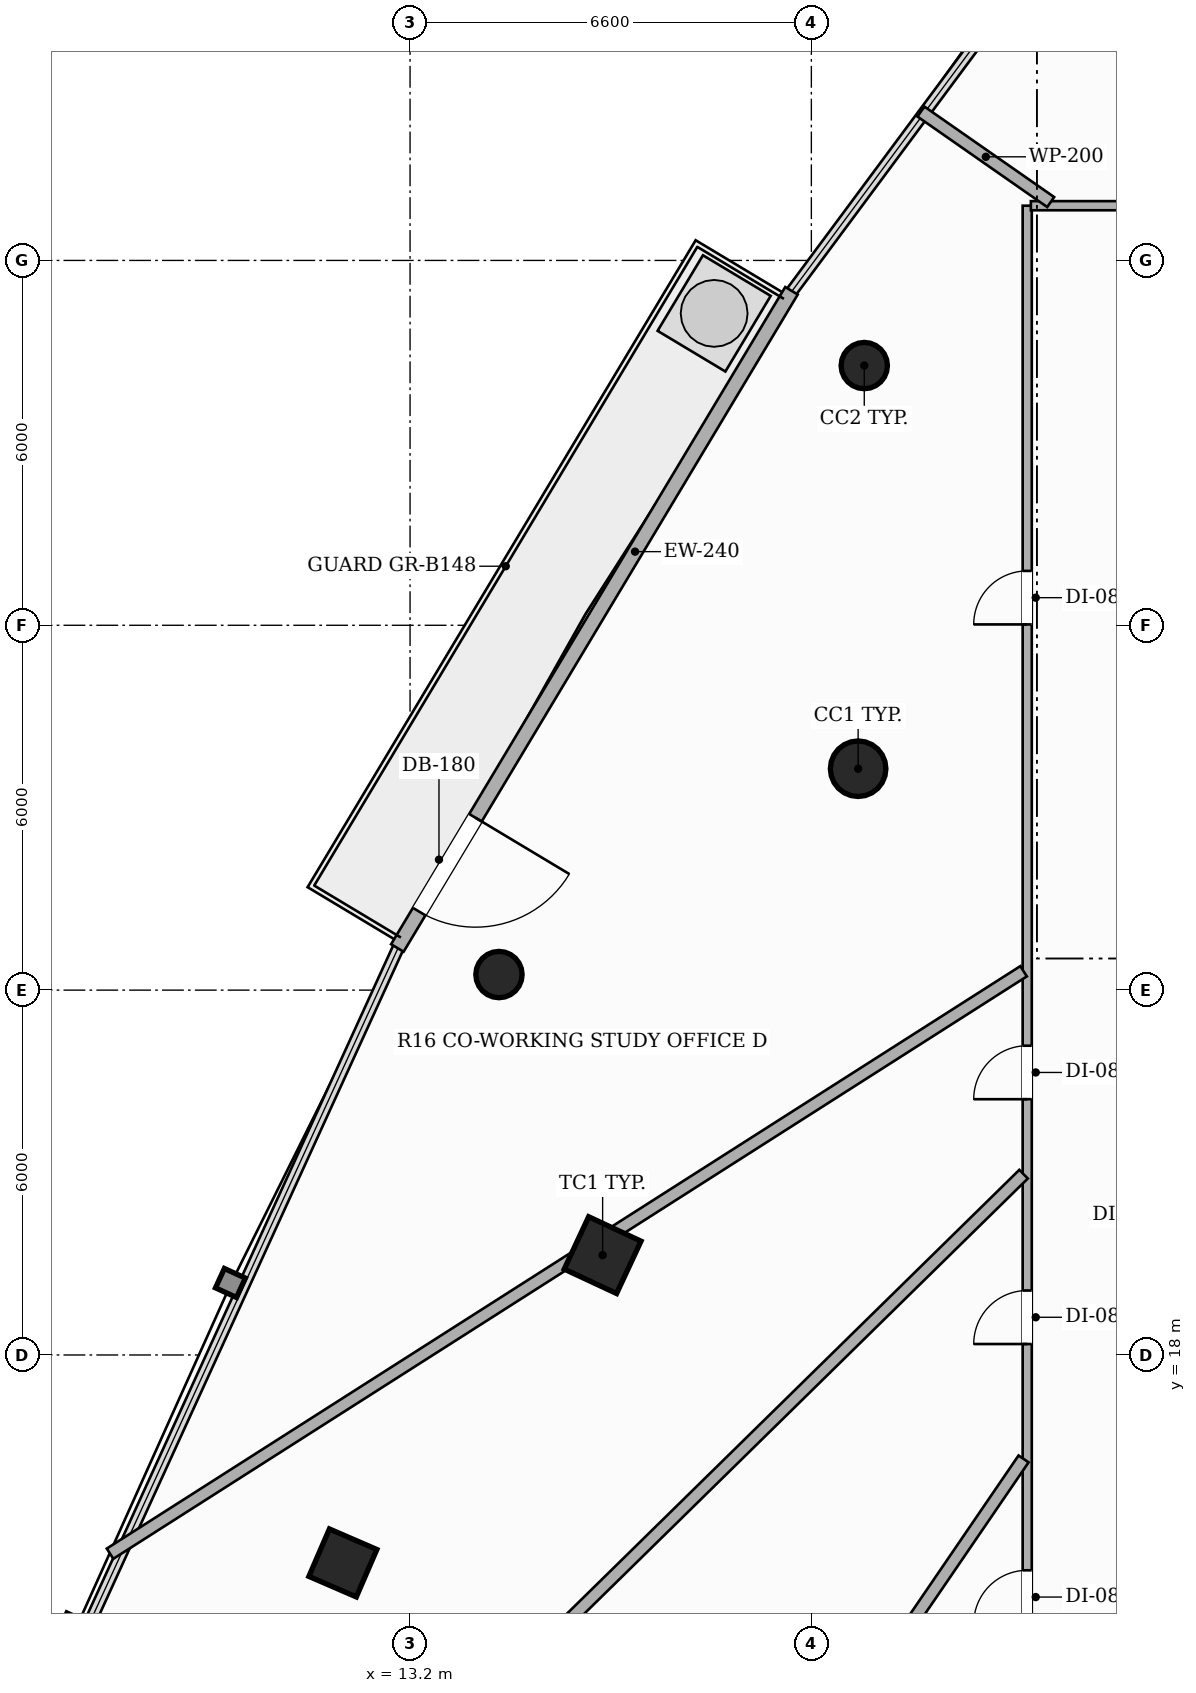
"""IFC4 building model, lengths in metres.
Left out: names, types, materials, properties, quantities, classifications, styles, units other than length and angle.
Written with IfcOpenShell. Run it as: python <this file> out.ifc"""

import sys

from ifc_helpers import new_model, si_unit, direction, frame, frame_2d, origin, origin_2d, place, context, subcontext, project, spatial, rectangle, hollow_rectangle, hollow_circle, extrude, element, fill, save


model = new_model("IFC4")
c1 = context("Model", 3, precision=1e-05, world=origin(), true_north=direction((0.0, 1.0)))
c2 = subcontext(c1, "Body", "Model", "MODEL_VIEW")
j1 = project(units=[si_unit("LENGTHUNIT", "METRE"), si_unit("PLANEANGLEUNIT", "RADIAN")], contexts=[c1])
p1 = place(None, origin())
s1 = spatial("IfcSite", under=j1, at=p1, CompositionType="ELEMENT")
p2 = place(p1, origin())
s2 = spatial("IfcBuilding", under=s1, at=p2, CompositionType="ELEMENT")
p3 = place(p2, frame((0.0, 0.0, 70.85)))
s3 = spatial("IfcBuildingStorey", under=s2, at=p3, CompositionType="ELEMENT", Elevation=70.85)
p4 = place(p3, frame((20.569, 27.641, 0.0), z_axis=(0.0, 0.0, 1.0), x_axis=(1.0, 0.0, 0.0)))
e1 = element("IfcColumn", 1, at=p4, inside=s3, PredefinedType="COLUMN", context=c2, shape_type="SweptSolid", body=[
    extrude(hollow_circle(Radius=0.457, WallThickness=0.025, at=origin_2d()), origin(), (0.0, 0.0, 1.0), 3.3),
])
p5 = place(p3, frame((16.367, 19.642, 0.0), z_axis=(0.0, 0.0, 1.0), x_axis=(0.422618261741, 0.906307787037, 0.0)))
e2 = element("IfcColumn", 2, at=p5, inside=s3, PredefinedType="COLUMN", context=c2, shape_type="SweptSolid", body=[
    extrude(hollow_rectangle(XDim=0.95, YDim=0.95, WallThickness=0.032, at=origin_2d()), origin(), (0.0, 0.0, 1.0), 3.3),
])
p6 = place(p3, frame((12.095, 14.58, 0.0), z_axis=(0.0, 0.0, 1.0), x_axis=(0.397147890635, 0.917754625684, 0.0)))
e3 = element("IfcColumn", 3, at=p6, inside=s3, PredefinedType="COLUMN", context=c2, shape_type="SweptSolid", body=[
    extrude(hollow_rectangle(XDim=0.85, YDim=0.85, WallThickness=0.028, at=origin_2d()), origin(), (0.0, 0.0, 1.0), 3.3),
])
for number, where, z_axis, x_axis in (
    (4, (20.67, 34.271, 0.0), (0.0, 0.0, 1.0), (1.0, 0.0, 0.0)),
    (5, (14.662, 24.256, 0.0), (0.0, 0.0, 1.0), (1.0, 0.0, 0.0)),
):
    element("IfcColumn", number, at=place(p3, frame(where, z_axis=z_axis, x_axis=x_axis)), inside=s3, PredefinedType="COLUMN", context=c2, shape_type="SweptSolid", body=[
        extrude(hollow_circle(Radius=0.381, WallThickness=0.022, at=origin_2d()), origin(), (0.0, 0.0, 1.0), 3.3),
    ])
p7 = place(p3, frame((19.473, 35.501, 0.0), z_axis=(0.0, 0.0, 1.0), x_axis=(-0.514333361126, -0.857590341382, 0.0)))
e6 = element("IfcWall", 6, at=p7, inside=s3, PredefinedType="SOLIDWALL", context=c2, shape_type="SweptSolid", body=[
    extrude(rectangle(XDim=12.603, YDim=0.24, at=frame_2d((6.301, 0.0))), origin(), (0.0, 0.0, 1.0), 2.624),
])
p8 = place(p7, frame((10.105, 0.0, 0.0)))
e7 = element("IfcOpeningElement", 7, at=p8, cuts=e6, PredefinedType="OPENING", context=c2, shape_type="SweptSolid", body=[
    extrude(rectangle(XDim=1.8, YDim=2.2, at=frame_2d((0.9, 1.1))), frame((0.0, 0.13, 0.0), z_axis=(0.0, -1.0, 0.0), x_axis=(1.0, 0.0, 0.0)), (0.0, 0.0, 1.0), 0.26),
])
p9 = place(p3, frame((23.35, 11.86, 0.0), z_axis=(0.0, 0.0, 1.0), x_axis=(0.0, 1.0, 0.0)))
e8 = element("IfcWall", 8, at=p9, inside=s3, PredefinedType="PARTITIONING", context=c2, shape_type="SweptSolid", body=[
    extrude(rectangle(XDim=25.04, YDim=0.15, at=frame_2d((12.52, 0.0))), origin(), (0.0, 0.0, 1.0), 2.413),
])
p10 = place(p9, frame((18.154, 0.0, 0.0)))
e9 = element("IfcOpeningElement", 9, at=p10, cuts=e8, PredefinedType="OPENING", context=c2, shape_type="SweptSolid", body=[
    extrude(rectangle(XDim=0.88, YDim=2.1, at=frame_2d((0.44, 1.05))), frame((0.0, 0.085, 0.0), z_axis=(0.0, -1.0, 0.0), x_axis=(1.0, 0.0, 0.0)), (0.0, 0.0, 1.0), 0.17),
])
p11 = place(p9, frame((10.346, 0.0, 0.0)))
e10 = element("IfcOpeningElement", 10, at=p11, cuts=e8, PredefinedType="OPENING", context=c2, shape_type="SweptSolid", body=[
    extrude(rectangle(XDim=0.88, YDim=2.1, at=frame_2d((0.44, 1.05))), frame((0.0, 0.085, 0.0), z_axis=(0.0, -1.0, 0.0), x_axis=(1.0, 0.0, 0.0)), (0.0, 0.0, 1.0), 0.17),
])
p12 = place(p9, frame((6.32, 0.0, 0.0)))
e11 = element("IfcOpeningElement", 11, at=p12, cuts=e8, PredefinedType="OPENING", context=c2, shape_type="SweptSolid", body=[
    extrude(rectangle(XDim=0.88, YDim=2.1, at=frame_2d((0.44, 1.05))), frame((0.0, 0.085, 0.0), z_axis=(0.0, -1.0, 0.0), x_axis=(1.0, 0.0, 0.0)), (0.0, 0.0, 1.0), 0.17),
])
p13 = place(p9, frame((1.719, 0.0, 0.0)))
e12 = element("IfcOpeningElement", 12, at=p13, cuts=e8, PredefinedType="OPENING", context=c2, shape_type="SweptSolid", body=[
    extrude(rectangle(XDim=0.88, YDim=2.1, at=frame_2d((0.44, 1.05))), frame((0.0, 0.085, 0.0), z_axis=(0.0, -1.0, 0.0), x_axis=(1.0, 0.0, 0.0)), (0.0, 0.0, 1.0), 0.17),
])
p14 = place(p3, frame((23.41, 36.9, 0.0), z_axis=(0.0, 0.0, 1.0), x_axis=(1.0, 0.0, 0.0)))
e13 = element("IfcWall", 13, at=p14, inside=s3, PredefinedType="PARTITIONING", context=c2, shape_type="SweptSolid", body=[
    extrude(rectangle(XDim=2.49, YDim=0.15, at=frame_2d((1.245, 0.0))), origin(), (0.0, 0.0, 1.0), 2.413),
])
p15 = place(p3, frame((23.736, 36.96, 0.0), z_axis=(0.0, 0.0, 1.0), x_axis=(-0.820275422115, 0.571968733302, 0.0)))
e14 = element("IfcWall", 14, at=p15, inside=s3, PredefinedType="PARTITIONING", context=c2, shape_type="SweptSolid", body=[
    extrude(rectangle(XDim=2.602, YDim=0.2, at=frame_2d((1.301, 0.0))), origin(), (0.0, 0.0, 1.0), 3.06),
])
p16 = place(p3, frame((23.29, 24.31, 0.0), z_axis=(0.0, 0.0, 1.0), x_axis=(-0.843217726059, -0.537572196509, 0.0)))
e15 = element("IfcWall", 15, at=p16, inside=s3, PredefinedType="PARTITIONING", context=c2, shape_type="SweptSolid", body=[
    extrude(rectangle(XDim=17.817, YDim=0.2, at=frame_2d((8.909, 0.0))), origin(), (0.0, 0.0, 1.0), 2.413),
])
p17 = place(p3, frame((23.29, 20.973, 0.0), z_axis=(0.0, 0.0, 1.0), x_axis=(-0.713831483248, -0.70031750908, 0.0)))
e16 = element("IfcWall", 16, at=p17, inside=s3, PredefinedType="PARTITIONING", context=c2, shape_type="SweptSolid", body=[
    extrude(rectangle(XDim=23.612, YDim=0.2, at=frame_2d((11.806, 0.0))), origin(), (0.0, 0.0, 1.0), 2.413),
])
p18 = place(p3, frame((23.29, 16.291, 0.0), z_axis=(0.0, 0.0, 1.0), x_axis=(-0.564210182678, -0.825631194761, 0.0)))
e17 = element("IfcWall", 17, at=p18, inside=s3, PredefinedType="PARTITIONING", context=c2, shape_type="SweptSolid", body=[
    extrude(rectangle(XDim=15.928, YDim=0.2, at=frame_2d((7.964, 0.0))), origin(), (0.0, 0.0, 1.0), 2.413),
])
p19 = place(p8, origin())
e18 = element("IfcDoor", 18, at=p19, inside=s3, OperationType="SINGLE_SWING_LEFT", PredefinedType="DOOR", context=c2, shape_type="SweptSolid", body=[
    extrude(rectangle(XDim=1.8, YDim=2.2, at=frame_2d((0.9, 1.1))), frame((0.0, 0.025, 0.0), z_axis=(0.0, -1.0, 0.0), x_axis=(1.0, 0.0, 0.0)), (0.0, 0.0, 1.0), 0.05),
])
fill(e7, e18)
p20 = place(p10, origin())
e19 = element("IfcDoor", 19, at=p20, inside=s3, OperationType="SINGLE_SWING_LEFT", PredefinedType="DOOR", context=c2, shape_type="SweptSolid", body=[
    extrude(rectangle(XDim=0.88, YDim=2.1, at=frame_2d((0.44, 1.05))), frame((0.0, 0.025, 0.0), z_axis=(0.0, -1.0, 0.0), x_axis=(1.0, 0.0, 0.0)), (0.0, 0.0, 1.0), 0.05),
])
fill(e9, e19)
p21 = place(p11, origin())
e20 = element("IfcDoor", 20, at=p21, inside=s3, OperationType="SINGLE_SWING_LEFT", PredefinedType="DOOR", context=c2, shape_type="SweptSolid", body=[
    extrude(rectangle(XDim=0.88, YDim=2.1, at=frame_2d((0.44, 1.05))), frame((0.0, 0.025, 0.0), z_axis=(0.0, -1.0, 0.0), x_axis=(1.0, 0.0, 0.0)), (0.0, 0.0, 1.0), 0.05),
])
fill(e10, e20)
p22 = place(p12, origin())
e21 = element("IfcDoor", 21, at=p22, inside=s3, OperationType="SINGLE_SWING_LEFT", PredefinedType="DOOR", context=c2, shape_type="SweptSolid", body=[
    extrude(rectangle(XDim=0.88, YDim=2.1, at=frame_2d((0.44, 1.05))), frame((0.0, 0.025, 0.0), z_axis=(0.0, -1.0, 0.0), x_axis=(1.0, 0.0, 0.0)), (0.0, 0.0, 1.0), 0.05),
])
fill(e11, e21)
p23 = place(p13, origin())
e22 = element("IfcDoor", 22, at=p23, inside=s3, OperationType="SINGLE_SWING_LEFT", PredefinedType="DOOR", context=c2, shape_type="SweptSolid", body=[
    extrude(rectangle(XDim=0.88, YDim=2.1, at=frame_2d((0.44, 1.05))), frame((0.0, 0.025, 0.0), z_axis=(0.0, -1.0, 0.0), x_axis=(1.0, 0.0, 0.0)), (0.0, 0.0, 1.0), 0.05),
])
fill(e12, e22)
save(model, sys.argv[1])
